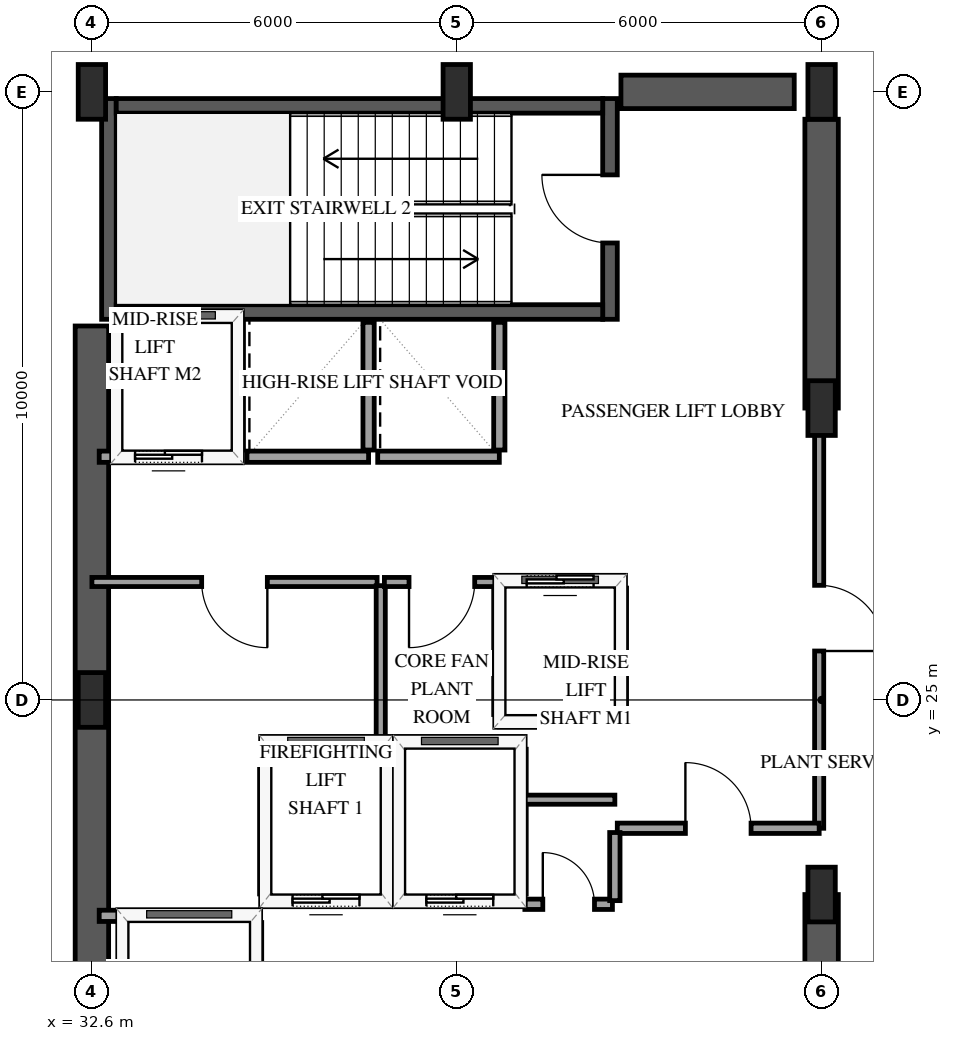
"""IFC4 building model, lengths in metres.
Left out: names, types, materials, properties, quantities, classifications, styles, units other than length and angle.
Written with IfcOpenShell. Run it as: python <this file> out.ifc"""

import sys

from ifc_helpers import new_model, si_unit, direction, frame, frame_2d, origin, origin_2d, place, context, subcontext, project, spatial, rectangle, extrude, element, fill, save


model = new_model("IFC4")
c1 = context("Model", 3, precision=1e-05, world=origin(), true_north=direction((0.0, 1.0)))
c2 = subcontext(c1, "Body", "Model", "MODEL_VIEW")
j1 = project(units=[si_unit("LENGTHUNIT", "METRE"), si_unit("PLANEANGLEUNIT", "RADIAN")], contexts=[c1])
p1 = place(None, origin())
s1 = spatial("IfcSite", under=j1, at=p1, CompositionType="ELEMENT")
p2 = place(p1, origin())
s2 = spatial("IfcBuilding", under=s1, at=p2, CompositionType="ELEMENT")
p3 = place(p2, frame((0.0, 0.0, 185.8)))
s3 = spatial("IfcBuildingStorey", under=s2, at=p3, CompositionType="ELEMENT", Elevation=185.8)
p4 = place(p3, frame((32.88, 31.26, 0.0), z_axis=(0.0, 0.0, 1.0), x_axis=(0.0, 1.0, 0.0)))
e1 = element("IfcWall", 1, at=p4, inside=s3, PredefinedType="SHEAR", context=c2, shape_type="SweptSolid", body=[
    extrude(rectangle(XDim=3.63, YDim=0.24, at=frame_2d((1.815, 0.0))), origin(), (0.0, 0.0, 1.0), 4.8),
])
p5 = place(p3, frame((41.12, 31.26, 0.0), z_axis=(0.0, 0.0, 1.0), x_axis=(0.0, 1.0, 0.0)))
e2 = element("IfcWall", 2, at=p5, inside=s3, PredefinedType="SHEAR", context=c2, shape_type="SweptSolid", body=[
    extrude(rectangle(XDim=3.63, YDim=0.24, at=frame_2d((1.815, 0.0))), origin(), (0.0, 0.0, 1.0), 4.8),
])
p6 = place(p5, frame((1.255, 0.0, 0.0)))
e3 = element("IfcOpeningElement", 3, at=p6, cuts=e2, PredefinedType="OPENING", context=c2, shape_type="SweptSolid", body=[
    extrude(rectangle(XDim=1.12, YDim=2.15, at=frame_2d((0.56, 1.075))), frame((0.0, 0.13, 0.0), z_axis=(0.0, -1.0, 0.0), x_axis=(1.0, 0.0, 0.0)), (0.0, 0.0, 1.0), 0.26),
])
for number, where, z_axis, x_axis in (
    (4, (33.0, 31.38, 0.0), (0.0, 0.0, 1.0), (1.0, 0.0, 0.0)),
    (5, (33.0, 34.77, 0.0), (0.0, 0.0, 1.0), (1.0, 0.0, 0.0)),
):
    element("IfcWall", number, at=place(p3, frame(where, z_axis=z_axis, x_axis=x_axis)), inside=s3, PredefinedType="SHEAR", context=c2, shape_type="SweptSolid", body=[
        extrude(rectangle(XDim=8.0, YDim=0.24, at=frame_2d((4.0, 0.0))), origin(), (0.0, 0.0, 1.0), 4.8),
    ])
p7 = place(p3, frame((32.6, 18.85, 0.0), z_axis=(0.0, 0.0, 1.0), x_axis=(0.0, 1.0, 0.0)))
e6 = element("IfcWall", 6, at=p7, inside=s3, PredefinedType="SHEAR", context=c2, shape_type="SweptSolid", body=[
    extrude(rectangle(XDim=12.3, YDim=0.55, at=frame_2d((6.15, 0.0))), origin(), (0.0, 0.0, 1.0), 4.8),
])
p8 = place(p3, frame((41.3, 35.0, 0.0), z_axis=(0.0, 0.0, 1.0), x_axis=(1.0, 0.0, 0.0)))
e7 = element("IfcWall", 7, at=p8, inside=s3, PredefinedType="SHEAR", context=c2, shape_type="SweptSolid", body=[
    extrude(rectangle(XDim=2.85, YDim=0.55, at=frame_2d((1.425, 0.0))), origin(), (0.0, 0.0, 1.0), 4.8),
])
p9 = place(p3, frame((44.6, 15.45, 0.0), z_axis=(0.0, 0.0, 1.0), x_axis=(0.0, 1.0, 0.0)))
e8 = element("IfcWall", 8, at=p9, inside=s3, PredefinedType="SHEAR", context=c2, shape_type="SweptSolid", body=[
    extrude(rectangle(XDim=6.35, YDim=0.55, at=frame_2d((3.175, 0.0))), origin(), (0.0, 0.0, 1.0), 4.8),
])
p10 = place(p3, frame((44.6, 29.8, 0.0), z_axis=(0.0, 0.0, 1.0), x_axis=(0.0, 1.0, 0.0)))
e9 = element("IfcWall", 9, at=p10, inside=s3, PredefinedType="SHEAR", context=c2, shape_type="SweptSolid", body=[
    extrude(rectangle(XDim=4.75, YDim=0.55, at=frame_2d((2.375, 0.0))), origin(), (0.0, 0.0, 1.0), 4.8),
])
for number, where, z_axis, x_axis in (
    (10, (32.6, 25.0, 0.0), (0.0, 0.0, 1.0), (1.0, 0.0, 0.0)),
    (11, (32.6, 35.0, 0.0), (0.0, 0.0, 1.0), (1.0, 0.0, 0.0)),
    (12, (38.6, 35.0, 0.0), (0.0, 0.0, 1.0), (1.0, 0.0, 0.0)),
    (13, (44.6, 21.8, 0.0), (0.0, 0.0, 1.0), (1.0, 0.0, 0.0)),
    (14, (44.6, 29.8, 0.0), (0.0, 0.0, 1.0), (1.0, 0.0, 0.0)),
    (15, (44.6, 35.0, 0.0), (0.0, 0.0, 1.0), (1.0, 0.0, 0.0)),
):
    element("IfcColumn", number, at=place(p3, frame(where, z_axis=z_axis, x_axis=x_axis)), inside=s3, PredefinedType="PILASTER", context=c2, shape_type="SweptSolid", body=[
        extrude(rectangle(XDim=0.45, YDim=0.9, at=origin_2d()), origin(), (0.0, 0.0, 1.0), 4.5),
    ])
p11 = place(p3, frame((35.45, 21.7, 0.0), z_axis=(0.0, 0.0, 1.0), x_axis=(1.0, 0.0, 0.0)))
e16 = element("IfcWall", 16, at=p11, inside=s3, PredefinedType="SOLIDWALL", context=c2, shape_type="SweptSolid", body=[
    extrude(rectangle(XDim=2.0, YDim=0.185, at=frame_2d((1.0, 0.0))), origin(), (0.0, 0.0, 1.0), 4.5),
])
p12 = place(p11, frame((0.45, 0.0, 0.0)))
e17 = element("IfcOpeningElement", 17, at=p12, cuts=e16, PredefinedType="OPENING", context=c2, shape_type="SweptSolid", body=[
    extrude(rectangle(XDim=1.1, YDim=2.15, at=frame_2d((0.55, 1.075))), frame((0.0, 0.103, 0.0), z_axis=(0.0, -1.0, 0.0), x_axis=(1.0, 0.0, 0.0)), (0.0, 0.0, 1.0), 0.205),
])
p13 = place(p3, frame((35.45, 24.3, 0.0), z_axis=(0.0, 0.0, 1.0), x_axis=(1.0, 0.0, 0.0)))
e18 = element("IfcWall", 18, at=p13, inside=s3, PredefinedType="SOLIDWALL", context=c2, shape_type="SweptSolid", body=[
    extrude(rectangle(XDim=2.0, YDim=0.185, at=frame_2d((1.0, 0.0))), origin(), (0.0, 0.0, 1.0), 4.5),
])
for number, where, z_axis, x_axis in (
    (19, (35.45, 21.81, 0.0), (0.0, 0.0, 1.0), (0.0, 1.0, 0.0)),
    (20, (37.45, 21.81, 0.0), (0.0, 0.0, 1.0), (0.0, 1.0, 0.0)),
):
    element("IfcWall", number, at=place(p3, frame(where, z_axis=z_axis, x_axis=x_axis)), inside=s3, PredefinedType="SOLIDWALL", context=c2, shape_type="SweptSolid", body=[
        extrude(rectangle(XDim=2.38, YDim=0.185, at=frame_2d((1.19, 0.0))), origin(), (0.0, 0.0, 1.0), 4.5),
    ])
p14 = place(p3, frame((37.65, 21.7, 0.0), z_axis=(0.0, 0.0, 1.0), x_axis=(1.0, 0.0, 0.0)))
e21 = element("IfcWall", 21, at=p14, inside=s3, PredefinedType="SOLIDWALL", context=c2, shape_type="SweptSolid", body=[
    extrude(rectangle(XDim=2.0, YDim=0.185, at=frame_2d((1.0, 0.0))), origin(), (0.0, 0.0, 1.0), 4.5),
])
p15 = place(p14, frame((0.45, 0.0, 0.0)))
e22 = element("IfcOpeningElement", 22, at=p15, cuts=e21, PredefinedType="OPENING", context=c2, shape_type="SweptSolid", body=[
    extrude(rectangle(XDim=1.1, YDim=2.15, at=frame_2d((0.55, 1.075))), frame((0.0, 0.103, 0.0), z_axis=(0.0, -1.0, 0.0), x_axis=(1.0, 0.0, 0.0)), (0.0, 0.0, 1.0), 0.205),
])
p16 = place(p3, frame((37.65, 24.3, 0.0), z_axis=(0.0, 0.0, 1.0), x_axis=(1.0, 0.0, 0.0)))
e23 = element("IfcWall", 23, at=p16, inside=s3, PredefinedType="SOLIDWALL", context=c2, shape_type="SweptSolid", body=[
    extrude(rectangle(XDim=2.0, YDim=0.185, at=frame_2d((1.0, 0.0))), origin(), (0.0, 0.0, 1.0), 4.5),
])
p17 = place(p3, frame((39.65, 21.81, 0.0), z_axis=(0.0, 0.0, 1.0), x_axis=(0.0, 1.0, 0.0)))
e24 = element("IfcWall", 24, at=p17, inside=s3, PredefinedType="SOLIDWALL", context=c2, shape_type="SweptSolid", body=[
    extrude(rectangle(XDim=2.38, YDim=0.185, at=frame_2d((1.19, 0.0))), origin(), (0.0, 0.0, 1.0), 4.5),
])
p18 = place(p3, frame((32.72, 21.45, 0.0), z_axis=(0.0, 0.0, 1.0), x_axis=(1.0, 0.0, 0.0)))
e25 = element("IfcWall", 25, at=p18, inside=s3, PredefinedType="SOLIDWALL", context=c2, shape_type="SweptSolid", body=[
    extrude(rectangle(XDim=2.58, YDim=0.185, at=frame_2d((1.29, 0.0))), origin(), (0.0, 0.0, 1.0), 4.5),
])
p19 = place(p3, frame((35.3, 18.79, 0.0), z_axis=(0.0, 0.0, 1.0), x_axis=(0.0, 1.0, 0.0)))
e26 = element("IfcWall", 26, at=p19, inside=s3, PredefinedType="SOLIDWALL", context=c2, shape_type="SweptSolid", body=[
    extrude(rectangle(XDim=2.55, YDim=0.185, at=frame_2d((1.275, 0.0))), origin(), (0.0, 0.0, 1.0), 4.5),
])
p20 = place(p19, frame((0.725, 0.0, 0.0)))
e27 = element("IfcOpeningElement", 27, at=p20, cuts=e26, PredefinedType="OPENING", context=c2, shape_type="SweptSolid", body=[
    extrude(rectangle(XDim=1.1, YDim=2.15, at=frame_2d((0.55, 1.075))), frame((0.0, 0.103, 0.0), z_axis=(0.0, -1.0, 0.0), x_axis=(1.0, 0.0, 0.0)), (0.0, 0.0, 1.0), 0.205),
])
p21 = place(p3, frame((39.3, 24.65, 0.0), z_axis=(0.0, 0.0, 1.0), x_axis=(1.0, 0.0, 0.0)))
e28 = element("IfcWall", 28, at=p21, inside=s3, PredefinedType="SOLIDWALL", context=c2, shape_type="SweptSolid", body=[
    extrude(rectangle(XDim=2.0, YDim=0.185, at=frame_2d((1.0, 0.0))), origin(), (0.0, 0.0, 1.0), 4.5),
])
p22 = place(p3, frame((39.3, 26.95, 0.0), z_axis=(0.0, 0.0, 1.0), x_axis=(1.0, 0.0, 0.0)))
e29 = element("IfcWall", 29, at=p22, inside=s3, PredefinedType="SOLIDWALL", context=c2, shape_type="SweptSolid", body=[
    extrude(rectangle(XDim=2.0, YDim=0.185, at=frame_2d((1.0, 0.0))), origin(), (0.0, 0.0, 1.0), 4.5),
])
p23 = place(p22, frame((0.45, 0.0, 0.0)))
e30 = element("IfcOpeningElement", 30, at=p23, cuts=e29, PredefinedType="OPENING", context=c2, shape_type="SweptSolid", body=[
    extrude(rectangle(XDim=1.1, YDim=2.15, at=frame_2d((0.55, 1.075))), frame((0.0, 0.103, 0.0), z_axis=(0.0, -1.0, 0.0), x_axis=(1.0, 0.0, 0.0)), (0.0, 0.0, 1.0), 0.205),
])
for number, where, z_axis, x_axis in (
    (31, (39.3, 24.76, 0.0), (0.0, 0.0, 1.0), (0.0, 1.0, 0.0)),
    (32, (41.3, 24.76, 0.0), (0.0, 0.0, 1.0), (0.0, 1.0, 0.0)),
):
    element("IfcWall", number, at=place(p3, frame(where, z_axis=z_axis, x_axis=x_axis)), inside=s3, PredefinedType="SOLIDWALL", context=c2, shape_type="SweptSolid", body=[
        extrude(rectangle(XDim=2.08, YDim=0.185, at=frame_2d((1.04, 0.0))), origin(), (0.0, 0.0, 1.0), 4.5),
    ])
p24 = place(p3, frame((32.72, 29.0, 0.0), z_axis=(0.0, 0.0, 1.0), x_axis=(1.0, 0.0, 0.0)))
e33 = element("IfcWall", 33, at=p24, inside=s3, PredefinedType="SOLIDWALL", context=c2, shape_type="SweptSolid", body=[
    extrude(rectangle(XDim=2.28, YDim=0.185, at=frame_2d((1.14, 0.0))), origin(), (0.0, 0.0, 1.0), 4.5),
])
p25 = place(p24, frame((0.59, 0.0, 0.0)))
e34 = element("IfcOpeningElement", 34, at=p25, cuts=e33, PredefinedType="OPENING", context=c2, shape_type="SweptSolid", body=[
    extrude(rectangle(XDim=1.1, YDim=2.15, at=frame_2d((0.55, 1.075))), frame((0.0, 0.103, 0.0), z_axis=(0.0, -1.0, 0.0), x_axis=(1.0, 0.0, 0.0)), (0.0, 0.0, 1.0), 0.205),
])
p26 = place(p3, frame((35.0, 29.11, 0.0), z_axis=(0.0, 0.0, 1.0), x_axis=(0.0, 1.0, 0.0)))
e35 = element("IfcWall", 35, at=p26, inside=s3, PredefinedType="SOLIDWALL", context=c2, shape_type="SweptSolid", body=[
    extrude(rectangle(XDim=2.1, YDim=0.185, at=frame_2d((1.05, 0.0))), origin(), (0.0, 0.0, 1.0), 4.5),
])
p27 = place(p3, frame((35.15, 29.0, 0.0), z_axis=(0.0, 0.0, 1.0), x_axis=(1.0, 0.0, 0.0)))
e36 = element("IfcWall", 36, at=p27, inside=s3, PredefinedType="SOLIDWALL", context=c2, shape_type="SweptSolid", body=[
    extrude(rectangle(XDim=2.0, YDim=0.185, at=frame_2d((1.0, 0.0))), origin(), (0.0, 0.0, 1.0), 4.5),
])
p28 = place(p3, frame((37.15, 29.11, 0.0), z_axis=(0.0, 0.0, 1.0), x_axis=(0.0, 1.0, 0.0)))
e37 = element("IfcWall", 37, at=p28, inside=s3, PredefinedType="SOLIDWALL", context=c2, shape_type="SweptSolid", body=[
    extrude(rectangle(XDim=2.1, YDim=0.185, at=frame_2d((1.05, 0.0))), origin(), (0.0, 0.0, 1.0), 4.5),
])
p29 = place(p3, frame((37.3, 29.0, 0.0), z_axis=(0.0, 0.0, 1.0), x_axis=(1.0, 0.0, 0.0)))
e38 = element("IfcWall", 38, at=p29, inside=s3, PredefinedType="SOLIDWALL", context=c2, shape_type="SweptSolid", body=[
    extrude(rectangle(XDim=2.0, YDim=0.185, at=frame_2d((1.0, 0.0))), origin(), (0.0, 0.0, 1.0), 4.5),
])
p30 = place(p3, frame((39.3, 29.11, 0.0), z_axis=(0.0, 0.0, 1.0), x_axis=(0.0, 1.0, 0.0)))
e39 = element("IfcWall", 39, at=p30, inside=s3, PredefinedType="SOLIDWALL", context=c2, shape_type="SweptSolid", body=[
    extrude(rectangle(XDim=2.1, YDim=0.185, at=frame_2d((1.05, 0.0))), origin(), (0.0, 0.0, 1.0), 4.5),
])
p31 = place(p3, frame((44.56, 29.8, 0.0), z_axis=(0.0, 0.0, 1.0), x_axis=(0.0, -1.0, 0.0)))
e40 = element("IfcWall", 40, at=p31, inside=s3, PredefinedType="PARTITIONING", context=c2, shape_type="SweptSolid", body=[
    extrude(rectangle(XDim=6.91, YDim=0.15, at=frame_2d((3.455, 0.0))), origin(), (0.0, 0.0, 1.0), 3.54),
])
p32 = place(p31, frame((2.915, 0.0, 0.0)))
e41 = element("IfcOpeningElement", 41, at=p32, cuts=e40, PredefinedType="OPENING", context=c2, shape_type="SweptSolid", body=[
    extrude(rectangle(XDim=1.08, YDim=2.15, at=frame_2d((0.54, 1.075))), frame((0.0, 0.085, 0.0), z_axis=(0.0, -1.0, 0.0), x_axis=(1.0, 0.0, 0.0)), (0.0, 0.0, 1.0), 0.17),
])
p33 = place(p3, frame((37.29, 26.94, 0.0), z_axis=(0.0, 0.0, 1.0), x_axis=(-1.0, 0.0, 0.0)))
e42 = element("IfcWall", 42, at=p33, inside=s3, PredefinedType="PARTITIONING", context=c2, shape_type="SweptSolid", body=[
    extrude(rectangle(XDim=4.69, YDim=0.15, at=frame_2d((2.345, 0.0))), origin(), (0.0, 0.0, 1.0), 4.5),
])
p34 = place(p33, frame((1.805, 0.0, 0.0)))
e43 = element("IfcOpeningElement", 43, at=p34, cuts=e42, PredefinedType="OPENING", context=c2, shape_type="SweptSolid", body=[
    extrude(rectangle(XDim=1.08, YDim=2.15, at=frame_2d((0.54, 1.075))), frame((0.0, 0.085, 0.0), z_axis=(0.0, -1.0, 0.0), x_axis=(1.0, 0.0, 0.0)), (0.0, 0.0, 1.0), 0.17),
])
p35 = place(p3, frame((41.24, 22.89, 0.0), z_axis=(0.0, 0.0, 1.0), x_axis=(1.0, 0.0, 0.0)))
e44 = element("IfcWall", 44, at=p35, inside=s3, PredefinedType="PARTITIONING", context=c2, shape_type="SweptSolid", body=[
    extrude(rectangle(XDim=3.32, YDim=0.17, at=frame_2d((1.66, 0.0))), origin(), (0.0, 0.0, 1.0), 4.5),
])
p36 = place(p35, frame((1.12, 0.0, 0.0)))
e45 = element("IfcOpeningElement", 45, at=p36, cuts=e44, PredefinedType="OPENING", context=c2, shape_type="SweptSolid", body=[
    extrude(rectangle(XDim=1.08, YDim=2.15, at=frame_2d((0.54, 1.075))), frame((0.0, 0.095, 0.0), z_axis=(0.0, -1.0, 0.0), x_axis=(1.0, 0.0, 0.0)), (0.0, 0.0, 1.0), 0.19),
])
p37 = place(p3, frame((37.35, 26.88, 0.0), z_axis=(0.0, 0.0, 1.0), x_axis=(0.0, -1.0, 0.0)))
e46 = element("IfcWall", 46, at=p37, inside=s3, PredefinedType="PARTITIONING", context=c2, shape_type="SweptSolid", body=[
    extrude(rectangle(XDim=2.58, YDim=0.15, at=frame_2d((1.29, 0.0))), origin(), (0.0, 0.0, 1.0), 4.5),
])
p38 = place(p3, frame((39.3, 26.94, 0.0), z_axis=(0.0, 0.0, 1.0), x_axis=(-1.0, 0.0, 0.0)))
e47 = element("IfcWall", 47, at=p38, inside=s3, PredefinedType="PARTITIONING", context=c2, shape_type="SweptSolid", body=[
    extrude(rectangle(XDim=1.89, YDim=0.15, at=frame_2d((0.945, 0.0))), origin(), (0.0, 0.0, 1.0), 4.5),
])
p39 = place(p38, frame((0.405, 0.0, 0.0)))
e48 = element("IfcOpeningElement", 48, at=p39, cuts=e47, PredefinedType="OPENING", context=c2, shape_type="SweptSolid", body=[
    extrude(rectangle(XDim=1.08, YDim=2.15, at=frame_2d((0.54, 1.075))), frame((0.0, 0.085, 0.0), z_axis=(0.0, -1.0, 0.0), x_axis=(1.0, 0.0, 0.0)), (0.0, 0.0, 1.0), 0.17),
])
p40 = place(p3, frame((39.72, 21.64, 0.0), z_axis=(0.0, 0.0, 1.0), x_axis=(1.0, 0.0, 0.0)))
e49 = element("IfcWall", 49, at=p40, inside=s3, PredefinedType="PARTITIONING", context=c2, shape_type="SweptSolid", body=[
    extrude(rectangle(XDim=1.44, YDim=0.17, at=frame_2d((0.72, 0.0))), origin(), (0.0, 0.0, 1.0), 4.5),
])
p41 = place(p40, frame((0.295, 0.0, 0.0)))
e50 = element("IfcOpeningElement", 50, at=p41, cuts=e49, PredefinedType="OPENING", context=c2, shape_type="SweptSolid", body=[
    extrude(rectangle(XDim=0.85, YDim=2.1, at=frame_2d((0.425, 1.05))), frame((0.0, 0.095, 0.0), z_axis=(0.0, -1.0, 0.0), x_axis=(1.0, 0.0, 0.0)), (0.0, 0.0, 1.0), 0.19),
])
p42 = place(p3, frame((41.2, 21.7, 0.0), z_axis=(0.0, 0.0, 1.0), x_axis=(0.0, 1.0, 0.0)))
e51 = element("IfcWall", 51, at=p42, inside=s3, PredefinedType="PARTITIONING", context=c2, shape_type="SweptSolid", body=[
    extrude(rectangle(XDim=1.12, YDim=0.17, at=frame_2d((0.56, 0.0))), origin(), (0.0, 0.0, 1.0), 4.5),
])
p43 = place(p3, frame((41.2, 23.36, 0.0), z_axis=(0.0, 0.0, 1.0), x_axis=(-1.0, 0.0, 0.0)))
e52 = element("IfcWall", 52, at=p43, inside=s3, PredefinedType="PARTITIONING", context=c2, shape_type="SweptSolid", body=[
    extrude(rectangle(XDim=1.48, YDim=0.15, at=frame_2d((0.74, 0.0))), origin(), (0.0, 0.0, 1.0), 4.5),
])
p44 = place(p12, origin())
e53 = element("IfcDoor", 53, at=p44, inside=s3, OperationType="SLIDING_TO_LEFT", PredefinedType="DOOR", context=c2, shape_type="SweptSolid", body=[
    extrude(rectangle(XDim=1.1, YDim=2.15, at=frame_2d((0.55, 1.075))), frame((0.0, 0.025, 0.0), z_axis=(0.0, -1.0, 0.0), x_axis=(1.0, 0.0, 0.0)), (0.0, 0.0, 1.0), 0.05),
])
fill(e17, e53)
p45 = place(p15, origin())
e54 = element("IfcDoor", 54, at=p45, inside=s3, OperationType="SLIDING_TO_LEFT", PredefinedType="DOOR", context=c2, shape_type="SweptSolid", body=[
    extrude(rectangle(XDim=1.1, YDim=2.15, at=frame_2d((0.55, 1.075))), frame((0.0, 0.025, 0.0), z_axis=(0.0, -1.0, 0.0), x_axis=(1.0, 0.0, 0.0)), (0.0, 0.0, 1.0), 0.05),
])
fill(e22, e54)
p46 = place(p23, origin())
e55 = element("IfcDoor", 55, at=p46, inside=s3, OperationType="SLIDING_TO_LEFT", PredefinedType="DOOR", context=c2, shape_type="SweptSolid", body=[
    extrude(rectangle(XDim=1.1, YDim=2.15, at=frame_2d((0.55, 1.075))), frame((0.0, 0.025, 0.0), z_axis=(0.0, -1.0, 0.0), x_axis=(1.0, 0.0, 0.0)), (0.0, 0.0, 1.0), 0.05),
])
fill(e30, e55)
p47 = place(p25, origin())
e56 = element("IfcDoor", 56, at=p47, inside=s3, OperationType="SLIDING_TO_LEFT", PredefinedType="DOOR", context=c2, shape_type="SweptSolid", body=[
    extrude(rectangle(XDim=1.1, YDim=2.15, at=frame_2d((0.55, 1.075))), frame((0.0, 0.025, 0.0), z_axis=(0.0, -1.0, 0.0), x_axis=(1.0, 0.0, 0.0)), (0.0, 0.0, 1.0), 0.05),
])
fill(e34, e56)
p48 = place(p6, origin())
e57 = element("IfcDoor", 57, at=p48, inside=s3, OperationType="SINGLE_SWING_RIGHT", PredefinedType="DOOR", context=c2, shape_type="SweptSolid", body=[
    extrude(rectangle(XDim=1.12, YDim=2.15, at=frame_2d((0.56, 1.075))), frame((0.0, 0.025, 0.0), z_axis=(0.0, -1.0, 0.0), x_axis=(1.0, 0.0, 0.0)), (0.0, 0.0, 1.0), 0.05),
])
fill(e3, e57)
p49 = place(p32, origin())
e58 = element("IfcDoor", 58, at=p49, inside=s3, OperationType="SINGLE_SWING_RIGHT", PredefinedType="DOOR", context=c2, shape_type="SweptSolid", body=[
    extrude(rectangle(XDim=1.08, YDim=2.15, at=frame_2d((0.54, 1.075))), frame((0.0, 0.025, 0.0), z_axis=(0.0, -1.0, 0.0), x_axis=(1.0, 0.0, 0.0)), (0.0, 0.0, 1.0), 0.05),
])
fill(e41, e58)
p50 = place(p34, origin())
e59 = element("IfcDoor", 59, at=p50, inside=s3, OperationType="SINGLE_SWING_LEFT", PredefinedType="DOOR", context=c2, shape_type="SweptSolid", body=[
    extrude(rectangle(XDim=1.08, YDim=2.15, at=frame_2d((0.54, 1.075))), frame((0.0, 0.025, 0.0), z_axis=(0.0, -1.0, 0.0), x_axis=(1.0, 0.0, 0.0)), (0.0, 0.0, 1.0), 0.05),
])
fill(e43, e59)
p51 = place(p36, origin())
e60 = element("IfcDoor", 60, at=p51, inside=s3, OperationType="SINGLE_SWING_LEFT", PredefinedType="DOOR", context=c2, shape_type="SweptSolid", body=[
    extrude(rectangle(XDim=1.08, YDim=2.15, at=frame_2d((0.54, 1.075))), frame((0.0, 0.025, 0.0), z_axis=(0.0, -1.0, 0.0), x_axis=(1.0, 0.0, 0.0)), (0.0, 0.0, 1.0), 0.05),
])
fill(e45, e60)
p52 = place(p39, origin())
e61 = element("IfcDoor", 61, at=p52, inside=s3, OperationType="SINGLE_SWING_RIGHT", PredefinedType="DOOR", context=c2, shape_type="SweptSolid", body=[
    extrude(rectangle(XDim=1.08, YDim=2.15, at=frame_2d((0.54, 1.075))), frame((0.0, 0.025, 0.0), z_axis=(0.0, -1.0, 0.0), x_axis=(1.0, 0.0, 0.0)), (0.0, 0.0, 1.0), 0.05),
])
fill(e48, e61)
p53 = place(p41, origin())
e62 = element("IfcDoor", 62, at=p53, inside=s3, OperationType="SINGLE_SWING_LEFT", PredefinedType="DOOR", context=c2, shape_type="SweptSolid", body=[
    extrude(rectangle(XDim=0.85, YDim=2.1, at=frame_2d((0.425, 1.05))), frame((0.0, 0.025, 0.0), z_axis=(0.0, -1.0, 0.0), x_axis=(1.0, 0.0, 0.0)), (0.0, 0.0, 1.0), 0.05),
])
fill(e50, e62)
save(model, sys.argv[1])
